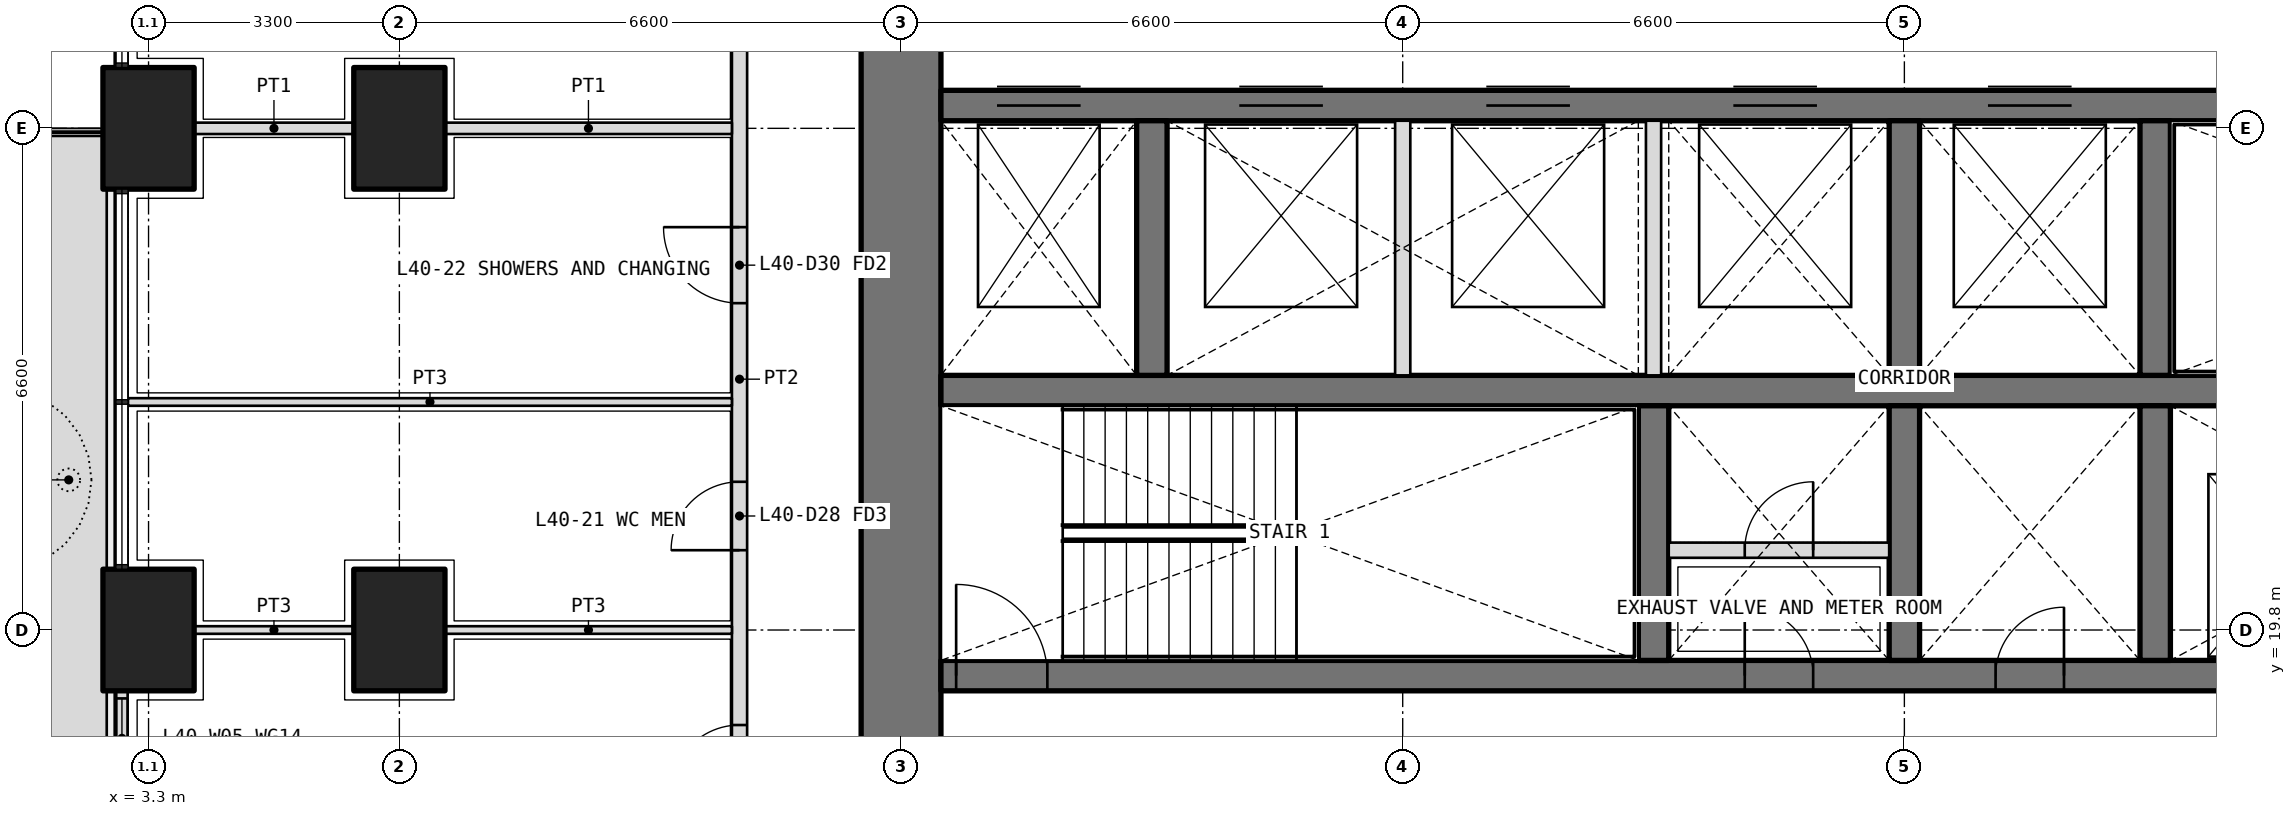
"""IFC4 building model, lengths in metres.
Left out: names, types, materials, properties, quantities, classifications, styles, units other than length and angle.
Written with IfcOpenShell. Run it as: python <this file> out.ifc"""

import sys

from ifc_helpers import new_model, si_unit, direction, frame, frame_2d, origin, origin_2d, place, context, subcontext, project, spatial, polyline, rectangle, outline, extrude, element, fill, save


model = new_model("IFC4")
c1 = context("Model", 3, precision=1e-05, world=origin(), true_north=direction((0.0, 1.0)))
c2 = subcontext(c1, "Body", "Model", "MODEL_VIEW")
j1 = project(units=[si_unit("LENGTHUNIT", "METRE"), si_unit("PLANEANGLEUNIT", "RADIAN")], contexts=[c1])
p1 = place(None, origin())
s1 = spatial("IfcSite", under=j1, at=p1, CompositionType="ELEMENT")
p2 = place(p1, origin())
s2 = spatial("IfcBuilding", under=s1, at=p2, CompositionType="ELEMENT")
p3 = place(p2, frame((0.0, 0.0, 176.7)))
s3 = spatial("IfcBuildingStorey", under=s2, at=p3, CompositionType="ELEMENT", Elevation=176.7)
for number, where, z_axis, x_axis in (
    (1, (3.3, 19.8, 0.0), (0.0, 0.0, 1.0), (0.0, 1.0, 0.0)),
    (2, (3.3, 26.4, 0.0), (0.0, 0.0, 1.0), (0.0, 1.0, 0.0)),
    (3, (6.6, 19.8, 0.0), (0.0, 0.0, 1.0), (0.0, 1.0, 0.0)),
    (4, (6.6, 26.4, 0.0), (0.0, 0.0, 1.0), (0.0, 1.0, 0.0)),
):
    element("IfcColumn", number, at=place(p3, frame(where, z_axis=z_axis, x_axis=x_axis)), inside=s3, PredefinedType="COLUMN", context=c2, shape_type="SweptSolid", body=[
        extrude(rectangle(XDim=1.6, YDim=1.2, at=origin_2d()), origin(), (0.0, 0.0, 1.0), 4.2),
    ])
p4 = place(p3, origin())
e5 = element("IfcWall", 5, at=p4, inside=s3, PredefinedType="USERDEFINED", context=c2, shape_type="SweptSolid", body=[
    extrude(outline(polyline([(1.75, 17.25), (2.75, 17.25), (2.75, 26.3), (1.75, 26.3), (1.75, 17.25)]), holes=[polyline([(1.9, 17.4), (2.6, 17.4), (2.6, 26.15), (1.9, 26.15), (1.9, 17.4)])]), origin(), (0.0, 0.0, 1.0), 1.05),
])
p5 = place(p3, frame((2.95, 19.0, 0.0), z_axis=(0.0, 0.0, 1.0), x_axis=(0.0, -1.0, 0.0)))
e6 = element("IfcWall", 6, at=p5, inside=s3, PredefinedType="SOLIDWALL", context=c2, shape_type="SweptSolid", body=[
    extrude(rectangle(XDim=5.0, YDim=0.15, at=frame_2d((2.5, 0.0))), origin(), (0.0, 0.0, 1.0), 2.7),
])
p6 = place(p5, frame((1.25, 0.0, 0.0)))
e7 = element("IfcOpeningElement", 7, at=p6, cuts=e6, PredefinedType="OPENING", context=c2, shape_type="SweptSolid", body=[
    extrude(rectangle(XDim=1.0, YDim=2.4, at=frame_2d((0.5, 1.2))), frame((0.0, 0.085, 0.0), z_axis=(0.0, -1.0, 0.0), x_axis=(1.0, 0.0, 0.0)), (0.0, 0.0, 1.0), 0.17),
])
p7 = place(p5, frame((0.1, 0.0, 0.1)))
e8 = element("IfcOpeningElement", 8, at=p7, cuts=e6, PredefinedType="OPENING", context=c2, shape_type="SweptSolid", body=[
    extrude(rectangle(XDim=1.05, YDim=2.3, at=frame_2d((0.525, 1.15))), frame((0.0, 0.085, 0.0), z_axis=(0.0, -1.0, 0.0), x_axis=(1.0, 0.0, 0.0)), (0.0, 0.0, 1.0), 0.17),
])
p8 = place(p5, frame((2.75, 0.0, 0.1)))
e9 = element("IfcOpeningElement", 9, at=p8, cuts=e6, PredefinedType="OPENING", context=c2, shape_type="SweptSolid", body=[
    extrude(rectangle(XDim=2.15, YDim=2.3, at=frame_2d((1.075, 1.15))), frame((0.0, 0.085, 0.0), z_axis=(0.0, -1.0, 0.0), x_axis=(1.0, 0.0, 0.0)), (0.0, 0.0, 1.0), 0.17),
])
p9 = place(p3, frame((13.2, 32.475, 0.0), z_axis=(0.0, 0.0, 1.0), x_axis=(0.0, -1.0, 0.0)))
e10 = element("IfcWall", 10, at=p9, inside=s3, PredefinedType="SHEAR", context=c2, shape_type="SweptSolid", body=[
    extrude(rectangle(XDim=18.75, YDim=1.05, at=frame_2d((9.375, 0.0))), origin(), (0.0, 0.0, 1.0), 4.2),
])
p10 = place(p9, frame((14.125, 0.0, 0.0)))
e11 = element("IfcOpeningElement", 11, at=p10, cuts=e10, PredefinedType="OPENING", context=c2, shape_type="SweptSolid", body=[
    extrude(rectangle(XDim=1.6, YDim=2.1, at=frame_2d((0.8, 1.05))), frame((0.0, 0.535, 0.0), z_axis=(0.0, -1.0, 0.0), x_axis=(1.0, 0.0, 0.0)), (0.0, 0.0, 1.0), 1.07),
])
p11 = place(p9, frame((3.325, 0.0, 0.0)))
e12 = element("IfcOpeningElement", 12, at=p11, cuts=e10, PredefinedType="OPENING", context=c2, shape_type="SweptSolid", body=[
    extrude(rectangle(XDim=1.6, YDim=2.1, at=frame_2d((0.8, 1.05))), frame((0.0, 0.535, 0.0), z_axis=(0.0, -1.0, 0.0), x_axis=(1.0, 0.0, 0.0)), (0.0, 0.0, 1.0), 1.07),
])
p12 = place(p3, frame((13.725, 19.2, 0.0), z_axis=(0.0, 0.0, 1.0), x_axis=(1.0, 0.0, 0.0)))
e13 = element("IfcWall", 13, at=p12, inside=s3, PredefinedType="SHEAR", context=c2, shape_type="SweptSolid", body=[
    extrude(rectangle(XDim=25.35, YDim=0.4, at=frame_2d((12.675, 0.0))), origin(), (0.0, 0.0, 1.0), 4.2),
])
p13 = place(p12, frame((10.575, 0.0, 0.0)))
e14 = element("IfcOpeningElement", 14, at=p13, cuts=e13, PredefinedType="OPENING", context=c2, shape_type="SweptSolid", body=[
    extrude(rectangle(XDim=0.9, YDim=2.1, at=frame_2d((0.45, 1.05))), frame((0.0, 0.21, 0.0), z_axis=(0.0, -1.0, 0.0), x_axis=(1.0, 0.0, 0.0)), (0.0, 0.0, 1.0), 0.42),
])
p14 = place(p12, frame((13.875, 0.0, 0.0)))
e15 = element("IfcOpeningElement", 15, at=p14, cuts=e13, PredefinedType="OPENING", context=c2, shape_type="SweptSolid", body=[
    extrude(rectangle(XDim=0.9, YDim=2.1, at=frame_2d((0.45, 1.05))), frame((0.0, 0.21, 0.0), z_axis=(0.0, -1.0, 0.0), x_axis=(1.0, 0.0, 0.0)), (0.0, 0.0, 1.0), 0.42),
])
p15 = place(p12, frame((0.2, 0.0, 0.0)))
e16 = element("IfcOpeningElement", 16, at=p15, cuts=e13, PredefinedType="OPENING", context=c2, shape_type="SweptSolid", body=[
    extrude(rectangle(XDim=1.2, YDim=2.1, at=frame_2d((0.6, 1.05))), frame((0.0, 0.21, 0.0), z_axis=(0.0, -1.0, 0.0), x_axis=(1.0, 0.0, 0.0)), (0.0, 0.0, 1.0), 0.42),
])
p16 = place(p12, frame((23.512, 0.0, 0.0)))
e17 = element("IfcOpeningElement", 17, at=p16, cuts=e13, PredefinedType="OPENING", context=c2, shape_type="SweptSolid", body=[
    extrude(rectangle(XDim=1.1, YDim=2.1, at=frame_2d((0.55, 1.05))), frame((0.0, 0.21, 0.0), z_axis=(0.0, -1.0, 0.0), x_axis=(1.0, 0.0, 0.0)), (0.0, 0.0, 1.0), 0.42),
])
p17 = place(p12, frame((17.125, 0.0, 0.0)))
e18 = element("IfcOpeningElement", 18, at=p17, cuts=e13, PredefinedType="OPENING", context=c2, shape_type="SweptSolid", body=[
    extrude(rectangle(XDim=1.1, YDim=2.1, at=frame_2d((0.55, 1.05))), frame((0.0, 0.21, 0.0), z_axis=(0.0, -1.0, 0.0), x_axis=(1.0, 0.0, 0.0)), (0.0, 0.0, 1.0), 0.42),
])
p18 = place(p12, frame((20.325, 0.0, 0.0)))
e19 = element("IfcOpeningElement", 19, at=p18, cuts=e13, PredefinedType="OPENING", context=c2, shape_type="SweptSolid", body=[
    extrude(rectangle(XDim=1.1, YDim=2.1, at=frame_2d((0.55, 1.05))), frame((0.0, 0.21, 0.0), z_axis=(0.0, -1.0, 0.0), x_axis=(1.0, 0.0, 0.0)), (0.0, 0.0, 1.0), 0.42),
])
p19 = place(p3, frame((13.725, 22.95, 0.0), z_axis=(0.0, 0.0, 1.0), x_axis=(1.0, 0.0, 0.0)))
e20 = element("IfcWall", 20, at=p19, inside=s3, PredefinedType="SHEAR", context=c2, shape_type="SweptSolid", body=[
    extrude(rectangle(XDim=25.35, YDim=0.4, at=frame_2d((12.675, 0.0))), origin(), (0.0, 0.0, 1.0), 4.2),
])
p20 = place(p3, frame((13.725, 26.7, 0.0), z_axis=(0.0, 0.0, 1.0), x_axis=(1.0, 0.0, 0.0)))
e21 = element("IfcWall", 21, at=p20, inside=s3, PredefinedType="SHEAR", context=c2, shape_type="SweptSolid", body=[
    extrude(rectangle(XDim=25.35, YDim=0.4, at=frame_2d((12.675, 0.0))), origin(), (0.0, 0.0, 1.0), 4.2),
])
p21 = place(p20, frame((23.95, 0.0, 0.0)))
e22 = element("IfcOpeningElement", 22, at=p21, cuts=e21, PredefinedType="OPENING", context=c2, shape_type="SweptSolid", body=[
    extrude(rectangle(XDim=1.2, YDim=2.1, at=frame_2d((0.6, 1.05))), frame((0.0, 0.21, 0.0), z_axis=(0.0, -1.0, 0.0), x_axis=(1.0, 0.0, 0.0)), (0.0, 0.0, 1.0), 0.42),
])
p22 = place(p20, frame((0.738, 0.0, 0.0)))
e23 = element("IfcOpeningElement", 23, at=p22, cuts=e21, PredefinedType="OPENING", context=c2, shape_type="SweptSolid", body=[
    extrude(rectangle(XDim=1.1, YDim=2.1, at=frame_2d((0.55, 1.05))), frame((0.0, 0.21, 0.0), z_axis=(0.0, -1.0, 0.0), x_axis=(1.0, 0.0, 0.0)), (0.0, 0.0, 1.0), 0.42),
])
p23 = place(p20, frame((3.925, 0.0, 0.0)))
e24 = element("IfcOpeningElement", 24, at=p23, cuts=e21, PredefinedType="OPENING", context=c2, shape_type="SweptSolid", body=[
    extrude(rectangle(XDim=1.1, YDim=2.1, at=frame_2d((0.55, 1.05))), frame((0.0, 0.21, 0.0), z_axis=(0.0, -1.0, 0.0), x_axis=(1.0, 0.0, 0.0)), (0.0, 0.0, 1.0), 0.42),
])
p24 = place(p20, frame((7.175, 0.0, 0.0)))
e25 = element("IfcOpeningElement", 25, at=p24, cuts=e21, PredefinedType="OPENING", context=c2, shape_type="SweptSolid", body=[
    extrude(rectangle(XDim=1.1, YDim=2.1, at=frame_2d((0.55, 1.05))), frame((0.0, 0.21, 0.0), z_axis=(0.0, -1.0, 0.0), x_axis=(1.0, 0.0, 0.0)), (0.0, 0.0, 1.0), 0.42),
])
p25 = place(p20, frame((10.425, 0.0, 0.0)))
e26 = element("IfcOpeningElement", 26, at=p25, cuts=e21, PredefinedType="OPENING", context=c2, shape_type="SweptSolid", body=[
    extrude(rectangle(XDim=1.1, YDim=2.1, at=frame_2d((0.55, 1.05))), frame((0.0, 0.21, 0.0), z_axis=(0.0, -1.0, 0.0), x_axis=(1.0, 0.0, 0.0)), (0.0, 0.0, 1.0), 0.42),
])
p26 = place(p20, frame((13.775, 0.0, 0.0)))
e27 = element("IfcOpeningElement", 27, at=p26, cuts=e21, PredefinedType="OPENING", context=c2, shape_type="SweptSolid", body=[
    extrude(rectangle(XDim=1.1, YDim=2.1, at=frame_2d((0.55, 1.05))), frame((0.0, 0.21, 0.0), z_axis=(0.0, -1.0, 0.0), x_axis=(1.0, 0.0, 0.0)), (0.0, 0.0, 1.0), 0.42),
])
for number, where, z_axis, x_axis in (
    (28, (23.1, 19.4, 0.0), (0.0, 0.0, 1.0), (0.0, 1.0, 0.0)),
    (29, (26.4, 19.4, 0.0), (0.0, 0.0, 1.0), (0.0, 1.0, 0.0)),
    (30, (29.7, 19.4, 0.0), (0.0, 0.0, 1.0), (0.0, 1.0, 0.0)),
    (31, (16.5, 23.15, 0.0), (0.0, 0.0, 1.0), (0.0, 1.0, 0.0)),
    (32, (26.4, 23.15, 0.0), (0.0, 0.0, 1.0), (0.0, 1.0, 0.0)),
    (33, (29.7, 23.15, 0.0), (0.0, 0.0, 1.0), (0.0, 1.0, 0.0)),
):
    element("IfcWall", number, at=place(p3, frame(where, z_axis=z_axis, x_axis=x_axis)), inside=s3, PredefinedType="SHEAR", context=c2, shape_type="SweptSolid", body=[
        extrude(rectangle(XDim=3.35, YDim=0.4, at=frame_2d((1.675, 0.0))), origin(), (0.0, 0.0, 1.0), 4.2),
    ])
for number, where, z_axis, x_axis in (
    (34, (19.8, 23.15, 0.0), (0.0, 0.0, 1.0), (0.0, 1.0, 0.0)),
    (35, (23.1, 23.15, 0.0), (0.0, 0.0, 1.0), (0.0, 1.0, 0.0)),
):
    element("IfcWall", number, at=place(p3, frame(where, z_axis=z_axis, x_axis=x_axis)), inside=s3, PredefinedType="PARTITIONING", context=c2, shape_type="SweptSolid", body=[
        extrude(rectangle(XDim=3.35, YDim=0.2, at=frame_2d((1.675, 0.0))), origin(), (0.0, 0.0, 1.0), 4.2),
    ])
p27 = place(p3, frame((11.075, 11.175, 0.0), z_axis=(0.0, 0.0, 1.0), x_axis=(0.0, 1.0, 0.0)))
e36 = element("IfcWall", 36, at=p27, inside=s3, PredefinedType="PARTITIONING", context=c2, shape_type="SweptSolid", body=[
    extrude(rectangle(XDim=23.85, YDim=0.2, at=frame_2d((11.925, 0.0))), origin(), (0.0, 0.0, 1.0), 2.85),
])
p28 = place(p27, frame((0.462, 0.0, 0.0)))
e37 = element("IfcOpeningElement", 37, at=p28, cuts=e36, PredefinedType="OPENING", context=c2, shape_type="SweptSolid", body=[
    extrude(rectangle(XDim=1.0, YDim=2.1, at=frame_2d((0.5, 1.05))), frame((0.0, 0.11, 0.0), z_axis=(0.0, -1.0, 0.0), x_axis=(1.0, 0.0, 0.0)), (0.0, 0.0, 1.0), 0.22),
])
p29 = place(p27, frame((3.125, 0.0, 0.0)))
e38 = element("IfcOpeningElement", 38, at=p29, cuts=e36, PredefinedType="OPENING", context=c2, shape_type="SweptSolid", body=[
    extrude(rectangle(XDim=1.0, YDim=2.1, at=frame_2d((0.5, 1.05))), frame((0.0, 0.11, 0.0), z_axis=(0.0, -1.0, 0.0), x_axis=(1.0, 0.0, 0.0)), (0.0, 0.0, 1.0), 0.22),
])
p30 = place(p27, frame((6.475, 0.0, 0.0)))
e39 = element("IfcOpeningElement", 39, at=p30, cuts=e36, PredefinedType="OPENING", context=c2, shape_type="SweptSolid", body=[
    extrude(rectangle(XDim=0.9, YDim=2.1, at=frame_2d((0.45, 1.05))), frame((0.0, 0.11, 0.0), z_axis=(0.0, -1.0, 0.0), x_axis=(1.0, 0.0, 0.0)), (0.0, 0.0, 1.0), 0.22),
])
p31 = place(p27, frame((9.675, 0.0, 0.0)))
e40 = element("IfcOpeningElement", 40, at=p31, cuts=e36, PredefinedType="OPENING", context=c2, shape_type="SweptSolid", body=[
    extrude(rectangle(XDim=0.9, YDim=2.1, at=frame_2d((0.45, 1.05))), frame((0.0, 0.11, 0.0), z_axis=(0.0, -1.0, 0.0), x_axis=(1.0, 0.0, 0.0)), (0.0, 0.0, 1.0), 0.22),
])
p32 = place(p27, frame((12.925, 0.0, 0.0)))
e41 = element("IfcOpeningElement", 41, at=p32, cuts=e36, PredefinedType="OPENING", context=c2, shape_type="SweptSolid", body=[
    extrude(rectangle(XDim=1.0, YDim=2.1, at=frame_2d((0.5, 1.05))), frame((0.0, 0.11, 0.0), z_axis=(0.0, -1.0, 0.0), x_axis=(1.0, 0.0, 0.0)), (0.0, 0.0, 1.0), 0.22),
])
p33 = place(p27, frame((19.087, 0.0, 0.0)))
e42 = element("IfcOpeningElement", 42, at=p33, cuts=e36, PredefinedType="OPENING", context=c2, shape_type="SweptSolid", body=[
    extrude(rectangle(XDim=1.0, YDim=2.1, at=frame_2d((0.5, 1.05))), frame((0.0, 0.11, 0.0), z_axis=(0.0, -1.0, 0.0), x_axis=(1.0, 0.0, 0.0)), (0.0, 0.0, 1.0), 0.22),
])
p34 = place(p3, frame((3.9, 19.8, 0.0), z_axis=(0.0, 0.0, 1.0), x_axis=(1.0, 0.0, 0.0)))
e43 = element("IfcWall", 43, at=p34, inside=s3, PredefinedType="PARTITIONING", context=c2, shape_type="SweptSolid", body=[
    extrude(rectangle(XDim=2.1, YDim=0.1, at=frame_2d((1.05, 0.0))), origin(), (0.0, 0.0, 1.0), 2.85),
])
p35 = place(p3, frame((7.2, 19.8, 0.0), z_axis=(0.0, 0.0, 1.0), x_axis=(1.0, 0.0, 0.0)))
e44 = element("IfcWall", 44, at=p35, inside=s3, PredefinedType="PARTITIONING", context=c2, shape_type="SweptSolid", body=[
    extrude(rectangle(XDim=3.775, YDim=0.1, at=frame_2d((1.888, 0.0))), origin(), (0.0, 0.0, 1.0), 2.85),
])
p36 = place(p3, frame((3.03, 22.8, 0.0), z_axis=(0.0, 0.0, 1.0), x_axis=(1.0, 0.0, 0.0)))
e45 = element("IfcWall", 45, at=p36, inside=s3, PredefinedType="PARTITIONING", context=c2, shape_type="SweptSolid", body=[
    extrude(rectangle(XDim=7.945, YDim=0.1, at=frame_2d((3.973, 0.0))), origin(), (0.0, 0.0, 1.0), 2.7),
])
p37 = place(p3, frame((3.9, 26.4, 0.0), z_axis=(0.0, 0.0, 1.0), x_axis=(1.0, 0.0, 0.0)))
e46 = element("IfcWall", 46, at=p37, inside=s3, PredefinedType="PARTITIONING", context=c2, shape_type="SweptSolid", body=[
    extrude(rectangle(XDim=2.1, YDim=0.15, at=frame_2d((1.05, 0.0))), origin(), (0.0, 0.0, 1.0), 2.85),
])
p38 = place(p3, frame((7.2, 26.4, 0.0), z_axis=(0.0, 0.0, 1.0), x_axis=(1.0, 0.0, 0.0)))
e47 = element("IfcWall", 47, at=p38, inside=s3, PredefinedType="PARTITIONING", context=c2, shape_type="SweptSolid", body=[
    extrude(rectangle(XDim=3.775, YDim=0.15, at=frame_2d((1.888, 0.0))), origin(), (0.0, 0.0, 1.0), 2.85),
])
p39 = place(p3, frame((23.3, 20.85, 0.0), z_axis=(0.0, 0.0, 1.0), x_axis=(1.0, 0.0, 0.0)))
e48 = element("IfcWall", 48, at=p39, inside=s3, PredefinedType="PARTITIONING", context=c2, shape_type="SweptSolid", body=[
    extrude(rectangle(XDim=2.9, YDim=0.2, at=frame_2d((1.45, 0.0))), origin(), (0.0, 0.0, 1.0), 3.9),
])
p40 = place(p39, frame((1.0, 0.0, 0.0)))
e49 = element("IfcOpeningElement", 49, at=p40, cuts=e48, PredefinedType="OPENING", context=c2, shape_type="SweptSolid", body=[
    extrude(rectangle(XDim=0.9, YDim=2.1, at=frame_2d((0.45, 1.05))), frame((0.0, 0.11, 0.0), z_axis=(0.0, -1.0, 0.0), x_axis=(1.0, 0.0, 0.0)), (0.0, 0.0, 1.0), 0.22),
])
p41 = place(p7, origin())
e50 = element("IfcWindow", 50, at=p41, inside=s3, PartitioningType="SINGLE_PANEL", PredefinedType="WINDOW", context=c2, shape_type="SweptSolid", body=[
    extrude(rectangle(XDim=1.05, YDim=2.3, at=frame_2d((0.525, 1.15))), frame((0.0, 0.03, 0.0), z_axis=(0.0, -1.0, 0.0), x_axis=(1.0, 0.0, 0.0)), (0.0, 0.0, 1.0), 0.06),
])
fill(e8, e50)
p42 = place(p30, origin())
e51 = element("IfcDoor", 51, at=p42, inside=s3, OperationType="SINGLE_SWING_LEFT", PredefinedType="DOOR", context=c2, shape_type="SweptSolid", body=[
    extrude(rectangle(XDim=0.9, YDim=2.1, at=frame_2d((0.45, 1.05))), frame((0.0, 0.025, 0.0), z_axis=(0.0, -1.0, 0.0), x_axis=(1.0, 0.0, 0.0)), (0.0, 0.0, 1.0), 0.05),
])
fill(e39, e51)
p43 = place(p31, origin())
e52 = element("IfcDoor", 52, at=p43, inside=s3, OperationType="SINGLE_SWING_LEFT", PredefinedType="DOOR", context=c2, shape_type="SweptSolid", body=[
    extrude(rectangle(XDim=0.9, YDim=2.1, at=frame_2d((0.45, 1.05))), frame((0.0, 0.025, 0.0), z_axis=(0.0, -1.0, 0.0), x_axis=(1.0, 0.0, 0.0)), (0.0, 0.0, 1.0), 0.05),
])
fill(e40, e52)
p44 = place(p32, origin())
e53 = element("IfcDoor", 53, at=p44, inside=s3, OperationType="SINGLE_SWING_RIGHT", PredefinedType="DOOR", context=c2, shape_type="SweptSolid", body=[
    extrude(rectangle(XDim=1.0, YDim=2.1, at=frame_2d((0.5, 1.05))), frame((0.0, 0.025, 0.0), z_axis=(0.0, -1.0, 0.0), x_axis=(1.0, 0.0, 0.0)), (0.0, 0.0, 1.0), 0.05),
])
fill(e41, e53)
p45 = place(p13, origin())
e54 = element("IfcDoor", 54, at=p45, inside=s3, OperationType="SINGLE_SWING_LEFT", PredefinedType="DOOR", context=c2, shape_type="SweptSolid", body=[
    extrude(rectangle(XDim=0.9, YDim=2.1, at=frame_2d((0.45, 1.05))), frame((0.0, 0.025, 0.0), z_axis=(0.0, -1.0, 0.0), x_axis=(1.0, 0.0, 0.0)), (0.0, 0.0, 1.0), 0.05),
])
fill(e14, e54)
p46 = place(p40, origin())
e55 = element("IfcDoor", 55, at=p46, inside=s3, OperationType="SINGLE_SWING_RIGHT", PredefinedType="DOOR", context=c2, shape_type="SweptSolid", body=[
    extrude(rectangle(XDim=0.9, YDim=2.1, at=frame_2d((0.45, 1.05))), frame((0.0, 0.025, 0.0), z_axis=(0.0, -1.0, 0.0), x_axis=(1.0, 0.0, 0.0)), (0.0, 0.0, 1.0), 0.05),
])
fill(e49, e55)
p47 = place(p14, origin())
e56 = element("IfcDoor", 56, at=p47, inside=s3, OperationType="SINGLE_SWING_RIGHT", PredefinedType="DOOR", context=c2, shape_type="SweptSolid", body=[
    extrude(rectangle(XDim=0.9, YDim=2.1, at=frame_2d((0.45, 1.05))), frame((0.0, 0.025, 0.0), z_axis=(0.0, -1.0, 0.0), x_axis=(1.0, 0.0, 0.0)), (0.0, 0.0, 1.0), 0.05),
])
fill(e15, e56)
p48 = place(p15, origin())
e57 = element("IfcDoor", 57, at=p48, inside=s3, OperationType="SINGLE_SWING_LEFT", PredefinedType="DOOR", context=c2, shape_type="SweptSolid", body=[
    extrude(rectangle(XDim=1.2, YDim=2.1, at=frame_2d((0.6, 1.05))), frame((0.0, 0.025, 0.0), z_axis=(0.0, -1.0, 0.0), x_axis=(1.0, 0.0, 0.0)), (0.0, 0.0, 1.0), 0.05),
])
fill(e16, e57)
p49 = place(p22, origin())
e58 = element("IfcDoor", 58, at=p49, inside=s3, OperationType="DOUBLE_DOOR_SLIDING", PredefinedType="DOOR", context=c2, shape_type="SweptSolid", body=[
    extrude(rectangle(XDim=1.1, YDim=2.1, at=frame_2d((0.55, 1.05))), frame((0.0, 0.025, 0.0), z_axis=(0.0, -1.0, 0.0), x_axis=(1.0, 0.0, 0.0)), (0.0, 0.0, 1.0), 0.05),
])
fill(e23, e58)
p50 = place(p23, origin())
e59 = element("IfcDoor", 59, at=p50, inside=s3, OperationType="DOUBLE_DOOR_SLIDING", PredefinedType="DOOR", context=c2, shape_type="SweptSolid", body=[
    extrude(rectangle(XDim=1.1, YDim=2.1, at=frame_2d((0.55, 1.05))), frame((0.0, 0.025, 0.0), z_axis=(0.0, -1.0, 0.0), x_axis=(1.0, 0.0, 0.0)), (0.0, 0.0, 1.0), 0.05),
])
fill(e24, e59)
p51 = place(p24, origin())
e60 = element("IfcDoor", 60, at=p51, inside=s3, OperationType="DOUBLE_DOOR_SLIDING", PredefinedType="DOOR", context=c2, shape_type="SweptSolid", body=[
    extrude(rectangle(XDim=1.1, YDim=2.1, at=frame_2d((0.55, 1.05))), frame((0.0, 0.025, 0.0), z_axis=(0.0, -1.0, 0.0), x_axis=(1.0, 0.0, 0.0)), (0.0, 0.0, 1.0), 0.05),
])
fill(e25, e60)
p52 = place(p25, origin())
e61 = element("IfcDoor", 61, at=p52, inside=s3, OperationType="DOUBLE_DOOR_SLIDING", PredefinedType="DOOR", context=c2, shape_type="SweptSolid", body=[
    extrude(rectangle(XDim=1.1, YDim=2.1, at=frame_2d((0.55, 1.05))), frame((0.0, 0.025, 0.0), z_axis=(0.0, -1.0, 0.0), x_axis=(1.0, 0.0, 0.0)), (0.0, 0.0, 1.0), 0.05),
])
fill(e26, e61)
p53 = place(p26, origin())
e62 = element("IfcDoor", 62, at=p53, inside=s3, OperationType="DOUBLE_DOOR_SLIDING", PredefinedType="DOOR", context=c2, shape_type="SweptSolid", body=[
    extrude(rectangle(XDim=1.1, YDim=2.1, at=frame_2d((0.55, 1.05))), frame((0.0, 0.025, 0.0), z_axis=(0.0, -1.0, 0.0), x_axis=(1.0, 0.0, 0.0)), (0.0, 0.0, 1.0), 0.05),
])
fill(e27, e62)
save(model, sys.argv[1])
